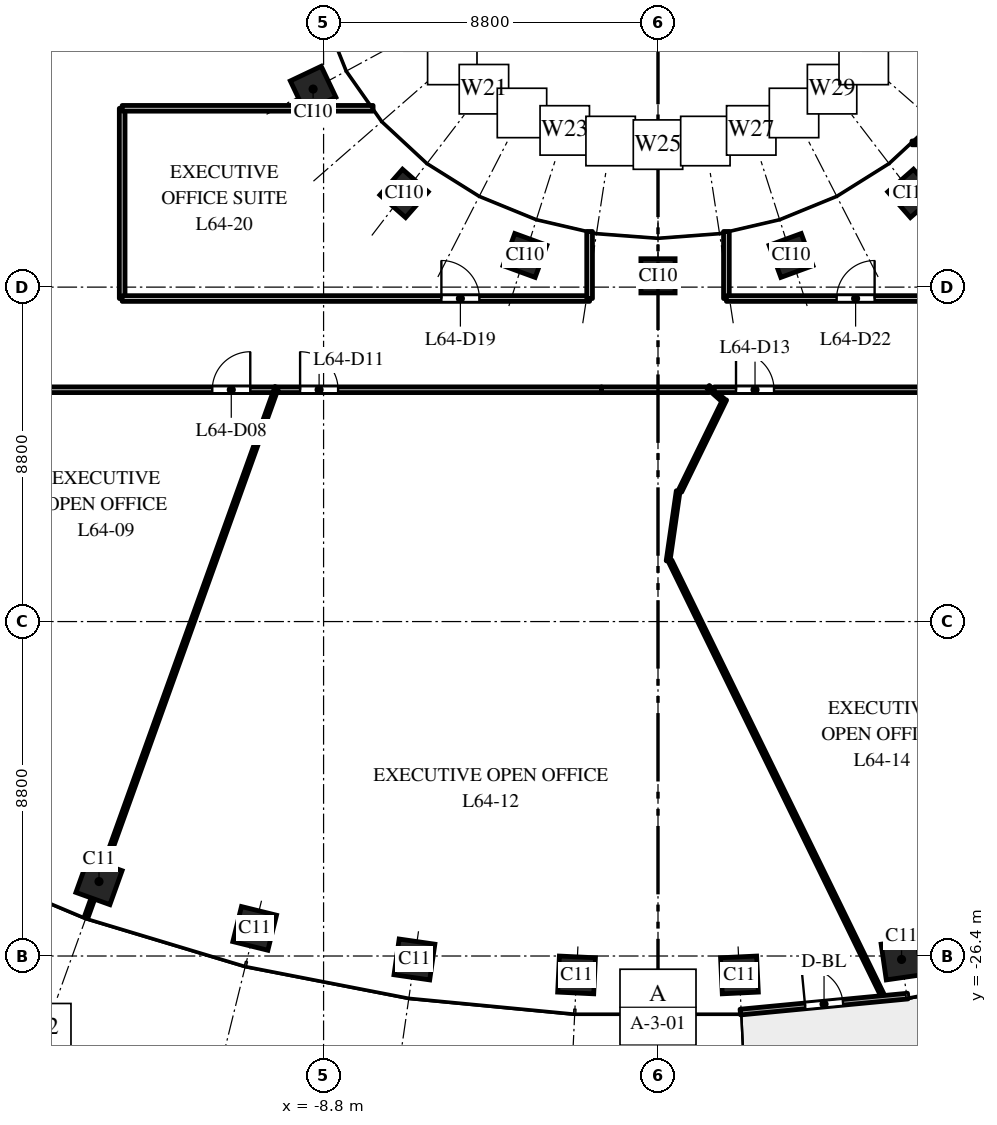
"""IFC4 building model, lengths in metres.
Left out: names, types, materials, properties, quantities, classifications, styles, units other than length and angle.
Written with IfcOpenShell. Run it as: python <this file> out.ifc"""

import sys

from ifc_helpers import new_model, si_unit, direction, frame, frame_2d, origin, origin_2d, place, context, subcontext, project, spatial, rectangle, extrude, element, fill, save


model = new_model("IFC4")
c1 = context("Model", 3, precision=1e-05, world=origin(), true_north=direction((0.0, 1.0)))
c2 = subcontext(c1, "Body", "Model", "MODEL_VIEW")
j1 = project(units=[si_unit("LENGTHUNIT", "METRE"), si_unit("PLANEANGLEUNIT", "RADIAN")], contexts=[c1])
p1 = place(None, origin())
s1 = spatial("IfcSite", under=j1, at=p1, CompositionType="ELEMENT")
p2 = place(p1, origin())
s2 = spatial("IfcBuilding", under=s1, at=p2, CompositionType="ELEMENT")
p3 = place(p2, frame((0.0, 0.0, 299.0)))
s3 = spatial("IfcBuildingStorey", under=s2, at=p3, CompositionType="ELEMENT", Elevation=299.0)
for number, where, z_axis, x_axis in (
    (1, (-14.709, -24.441, 0.0), (0.0, 0.0, 1.0), (0.941, -0.338, 0.0)),
    (2, (-10.613, -25.674, 0.0), (0.0, 0.0, 1.0), (0.971, -0.24, 0.0)),
    (3, (-6.409, -26.491, 0.0), (0.0, 0.0, 1.0), (0.99, -0.143, 0.0)),
    (4, (-2.143, -26.898, 0.0), (0.0, 0.0, 1.0), (0.999, -0.048, 0.0)),
    (5, (2.143, -26.898, 0.0), (0.0, 0.0, 1.0), (0.999, 0.048, 0.0)),
    (6, (6.409, -26.491, 0.0), (0.0, 0.0, 1.0), (0.99, 0.143, 0.0)),
):
    element("IfcColumn", number, at=place(p3, frame(where, z_axis=z_axis, x_axis=x_axis)), inside=s3, PredefinedType="COLUMN", context=c2, shape_type="SweptSolid", body=[
        extrude(rectangle(XDim=0.95, YDim=0.95, at=origin_2d()), origin(), (0.0, 0.0, 1.0), 4.0),
    ])
for number, where, z_axis, x_axis in (
    (7, (-9.076, -3.588, 0.0), (0.0, 0.0, 1.0), (0.429, -0.903, 0.0)),
    (8, (-6.682, -6.334, 0.0), (0.0, 0.0, 1.0), (0.751, -0.66, 0.0)),
    (9, (-3.501, -7.967, 0.0), (0.0, 0.0, 1.0), (0.939, -0.344, 0.0)),
    (10, (0.0, -8.503, 0.0), (0.0, 0.0, 1.0), (1.0, 0.0, 0.0)),
    (11, (3.501, -7.967, 0.0), (0.0, 0.0, 1.0), (0.939, 0.344, 0.0)),
    (12, (6.682, -6.334, 0.0), (0.0, 0.0, 1.0), (0.751, 0.66, 0.0)),
):
    element("IfcColumn", number, at=place(p3, frame(where, z_axis=z_axis, x_axis=x_axis)), inside=s3, PredefinedType="COLUMN", context=c2, shape_type="SweptSolid", body=[
        extrude(rectangle(XDim=0.9, YDim=0.9, at=origin_2d()), origin(), (0.0, 0.0, 1.0), 4.0),
    ])
p4 = place(p3, frame((2.166, -27.875, 0.0), z_axis=(0.0, 0.0, 1.0), x_axis=(0.995473879823, 0.095035543824, 0.0)))
e13 = element("IfcWall", 13, at=p4, inside=s3, PredefinedType="STANDARD", context=c2, shape_type="SweptSolid", body=[
    extrude(rectangle(XDim=4.426, YDim=0.15, at=frame_2d((2.213, 0.0))), origin(), (0.0, 0.0, 1.0), 3.7),
])
p5 = place(p4, frame((1.713, 0.0, 0.0)))
e14 = element("IfcOpeningElement", 14, at=p5, cuts=e13, PredefinedType="OPENING", context=c2, shape_type="SweptSolid", body=[
    extrude(rectangle(XDim=1.0, YDim=2.4, at=frame_2d((0.5, 1.2))), frame((0.0, 0.085, 0.0), z_axis=(0.0, -1.0, 0.0), x_axis=(1.0, 0.0, 0.0)), (0.0, 0.0, 1.0), 0.17),
])
p6 = place(p3, frame((-31.5, -11.5, 0.0), z_axis=(0.0, 0.0, 1.0), x_axis=(1.0, 0.0, 0.0)))
e15 = element("IfcWall", 15, at=p6, inside=s3, PredefinedType="PARTITIONING", context=c2, shape_type="SweptSolid", body=[
    extrude(rectangle(XDim=21.432, YDim=0.15, at=frame_2d((10.716, 0.0))), origin(), (0.0, 0.0, 1.0), 2.75),
])
p7 = place(p6, frame((9.15, 0.0, 0.0)))
e16 = element("IfcOpeningElement", 16, at=p7, cuts=e15, PredefinedType="OPENING", context=c2, shape_type="SweptSolid", body=[
    extrude(rectangle(XDim=1.0, YDim=2.1, at=frame_2d((0.5, 1.05))), frame((0.0, 0.085, 0.0), z_axis=(0.0, -1.0, 0.0), x_axis=(1.0, 0.0, 0.0)), (0.0, 0.0, 1.0), 0.17),
])
p8 = place(p6, frame((19.771, 0.0, 0.0)))
e17 = element("IfcOpeningElement", 17, at=p8, cuts=e15, PredefinedType="OPENING", context=c2, shape_type="SweptSolid", body=[
    extrude(rectangle(XDim=1.0, YDim=2.1, at=frame_2d((0.5, 1.05))), frame((0.0, 0.085, 0.0), z_axis=(0.0, -1.0, 0.0), x_axis=(1.0, 0.0, 0.0)), (0.0, 0.0, 1.0), 0.17),
])
p9 = place(p3, frame((-15.048, -25.383, 0.0), z_axis=(0.0, 0.0, 1.0), x_axis=(0.338396469125, 0.941003628943, 0.0)))
e18 = element("IfcWall", 18, at=p9, inside=s3, PredefinedType="PARTITIONING", context=c2, shape_type="SweptSolid", body=[
    extrude(rectangle(XDim=14.829, YDim=0.1, at=frame_2d((7.415, 0.0))), origin(), (0.0, 0.0, 1.0), 2.75),
])
p10 = place(p3, frame((-14.1, -9.1, 0.0), z_axis=(0.0, 0.0, 1.0), x_axis=(0.0, 1.0, 0.0)))
e19 = element("IfcWall", 19, at=p10, inside=s3, PredefinedType="PARTITIONING", context=c2, shape_type="SweptSolid", body=[
    extrude(rectangle(XDim=5.005, YDim=0.15, at=frame_2d((2.502, 0.0))), origin(), (0.0, 0.0, 1.0), 3.7),
])
p11 = place(p3, frame((-14.1, -9.1, 0.0), z_axis=(0.0, 0.0, 1.0), x_axis=(1.0, 0.0, 0.0)))
e20 = element("IfcWall", 20, at=p11, inside=s3, PredefinedType="PARTITIONING", context=c2, shape_type="SweptSolid", body=[
    extrude(rectangle(XDim=12.3, YDim=0.15, at=frame_2d((6.15, 0.0))), origin(), (0.0, 0.0, 1.0), 2.75),
])
p12 = place(p11, frame((8.4, 0.0, 0.0)))
e21 = element("IfcOpeningElement", 21, at=p12, cuts=e20, PredefinedType="OPENING", context=c2, shape_type="SweptSolid", body=[
    extrude(rectangle(XDim=1.0, YDim=2.1, at=frame_2d((0.5, 1.05))), frame((0.0, 0.085, 0.0), z_axis=(0.0, -1.0, 0.0), x_axis=(1.0, 0.0, 0.0)), (0.0, 0.0, 1.0), 0.17),
])
p13 = place(p3, frame((-14.1, -4.095, 0.0), z_axis=(0.0, 0.0, 1.0), x_axis=(1.0, 0.0, 0.0)))
e22 = element("IfcWall", 22, at=p13, inside=s3, PredefinedType="PARTITIONING", context=c2, shape_type="SweptSolid", body=[
    extrude(rectangle(XDim=6.603, YDim=0.15, at=frame_2d((3.302, 0.0))), origin(), (0.0, 0.0, 1.0), 3.0),
])
p14 = place(p3, frame((-10.003, -11.5, 0.0), z_axis=(0.0, 0.0, 1.0), x_axis=(1.0, 0.0, 0.0)))
e23 = element("IfcWall", 23, at=p14, inside=s3, PredefinedType="PARTITIONING", context=c2, shape_type="SweptSolid", body=[
    extrude(rectangle(XDim=8.518, YDim=0.15, at=frame_2d((4.259, 0.0))), origin(), (0.0, 0.0, 1.0), 2.75),
])
p15 = place(p14, frame((0.585, 0.0, 0.0)))
e24 = element("IfcOpeningElement", 24, at=p15, cuts=e23, PredefinedType="OPENING", context=c2, shape_type="SweptSolid", body=[
    extrude(rectangle(XDim=1.0, YDim=2.1, at=frame_2d((0.5, 1.05))), frame((0.0, 0.085, 0.0), z_axis=(0.0, -1.0, 0.0), x_axis=(1.0, 0.0, 0.0)), (0.0, 0.0, 1.0), 0.17),
])
p16 = place(p3, frame((-1.8, -9.1, 0.0), z_axis=(0.0, 0.0, 1.0), x_axis=(0.0, 1.0, 0.0)))
e25 = element("IfcWall", 25, at=p16, inside=s3, PredefinedType="PARTITIONING", context=c2, shape_type="SweptSolid", body=[
    extrude(rectangle(XDim=1.764, YDim=0.15, at=frame_2d((0.882, 0.0))), origin(), (0.0, 0.0, 1.0), 3.0),
])
p17 = place(p3, frame((-1.488, -11.5, 0.0), z_axis=(0.0, 0.0, 1.0), x_axis=(1.0, 0.0, 0.0)))
e26 = element("IfcWall", 26, at=p17, inside=s3, PredefinedType="PARTITIONING", context=c2, shape_type="SweptSolid", body=[
    extrude(rectangle(XDim=2.841, YDim=0.15, at=frame_2d((1.42, 0.0))), origin(), (0.0, 0.0, 1.0), 2.85),
])
p18 = place(p3, frame((0.265, -16.008, 0.0), z_axis=(0.0, 0.0, 1.0), x_axis=(0.142907964002, 0.989735981878, 0.0)))
e27 = element("IfcWall", 27, at=p18, inside=s3, PredefinedType="PARTITIONING", context=c2, shape_type="SweptSolid", body=[
    extrude(rectangle(XDim=1.862, YDim=0.1, at=frame_2d((0.931, 0.0))), origin(), (0.0, 0.0, 1.0), 3.7),
])
p19 = place(p3, frame((0.317, -16.0, 0.0), z_axis=(0.0, 0.0, 1.0), x_axis=(0.43922717886, -0.898376026701, 0.0)))
e28 = element("IfcWall", 28, at=p19, inside=s3, PredefinedType="PARTITIONING", context=c2, shape_type="SweptSolid", body=[
    extrude(rectangle(XDim=12.843, YDim=0.1, at=frame_2d((6.422, 0.0))), origin(), (0.0, 0.0, 1.0), 3.0),
])
p20 = place(p3, frame((0.577, -14.173, 0.0), z_axis=(0.0, 0.0, 1.0), x_axis=(0.43904776377, 0.898463722767, 0.0)))
e29 = element("IfcWall", 29, at=p20, inside=s3, PredefinedType="PARTITIONING", context=c2, shape_type="SweptSolid", body=[
    extrude(rectangle(XDim=2.697, YDim=0.1, at=frame_2d((1.349, 0.0))), origin(), (0.0, 0.0, 1.0), 3.7),
])
p21 = place(p3, frame((1.318, -11.425, 0.0), z_axis=(0.0, 0.0, 1.0), x_axis=(0.748043921786, -0.663649222918, 0.0)))
e30 = element("IfcWall", 30, at=p21, inside=s3, PredefinedType="PARTITIONING", context=c2, shape_type="SweptSolid", body=[
    extrude(rectangle(XDim=0.509, YDim=0.1, at=frame_2d((0.254, 0.0))), origin(), (0.0, 0.0, 1.0), 3.7),
])
p22 = place(p3, frame((1.478, -11.5, 0.0), z_axis=(0.0, 0.0, 1.0), x_axis=(1.0, 0.0, 0.0)))
e31 = element("IfcWall", 31, at=p22, inside=s3, PredefinedType="PARTITIONING", context=c2, shape_type="SweptSolid", body=[
    extrude(rectangle(XDim=5.634, YDim=0.15, at=frame_2d((2.817, 0.0))), origin(), (0.0, 0.0, 1.0), 2.85),
])
p23 = place(p22, frame((0.575, 0.0, 0.0)))
e32 = element("IfcOpeningElement", 32, at=p23, cuts=e31, PredefinedType="OPENING", context=c2, shape_type="SweptSolid", body=[
    extrude(rectangle(XDim=1.0, YDim=2.1, at=frame_2d((0.5, 1.05))), frame((0.0, 0.085, 0.0), z_axis=(0.0, -1.0, 0.0), x_axis=(1.0, 0.0, 0.0)), (0.0, 0.0, 1.0), 0.17),
])
p24 = place(p3, frame((1.8, -9.1, 0.0), z_axis=(0.0, 0.0, 1.0), x_axis=(0.0, 1.0, 0.0)))
e33 = element("IfcWall", 33, at=p24, inside=s3, PredefinedType="PARTITIONING", context=c2, shape_type="SweptSolid", body=[
    extrude(rectangle(XDim=1.764, YDim=0.15, at=frame_2d((0.882, 0.0))), origin(), (0.0, 0.0, 1.0), 3.0),
])
p25 = place(p3, frame((1.8, -9.1, 0.0), z_axis=(0.0, 0.0, 1.0), x_axis=(1.0, 0.0, 0.0)))
e34 = element("IfcWall", 34, at=p25, inside=s3, PredefinedType="PARTITIONING", context=c2, shape_type="SweptSolid", body=[
    extrude(rectangle(XDim=12.3, YDim=0.15, at=frame_2d((6.15, 0.0))), origin(), (0.0, 0.0, 1.0), 2.85),
])
p26 = place(p25, frame((2.9, 0.0, 0.0)))
e35 = element("IfcOpeningElement", 35, at=p26, cuts=e34, PredefinedType="OPENING", context=c2, shape_type="SweptSolid", body=[
    extrude(rectangle(XDim=1.0, YDim=2.1, at=frame_2d((0.5, 1.05))), frame((0.0, 0.085, 0.0), z_axis=(0.0, -1.0, 0.0), x_axis=(1.0, 0.0, 0.0)), (0.0, 0.0, 1.0), 0.17),
])
p27 = place(p3, frame((6.684, -5.005, 0.0), z_axis=(0.0, 0.0, 1.0), x_axis=(1.0, 0.0, 0.0)))
e36 = element("IfcWall", 36, at=p27, inside=s3, PredefinedType="PARTITIONING", context=c2, shape_type="SweptSolid", body=[
    extrude(rectangle(XDim=7.341, YDim=0.1, at=frame_2d((3.67, 0.0))), origin(), (0.0, 0.0, 1.0), 2.75),
])
p28 = place(p5, origin())
e37 = element("IfcDoor", 37, at=p28, inside=s3, OperationType="SINGLE_SWING_LEFT", PredefinedType="DOOR", context=c2, shape_type="SweptSolid", body=[
    extrude(rectangle(XDim=1.0, YDim=2.4, at=frame_2d((0.5, 1.2))), frame((0.0, 0.025, 0.0), z_axis=(0.0, -1.0, 0.0), x_axis=(1.0, 0.0, 0.0)), (0.0, 0.0, 1.0), 0.05),
])
fill(e14, e37)
p29 = place(p8, origin())
e38 = element("IfcDoor", 38, at=p29, inside=s3, OperationType="SINGLE_SWING_RIGHT", PredefinedType="DOOR", context=c2, shape_type="SweptSolid", body=[
    extrude(rectangle(XDim=1.0, YDim=2.1, at=frame_2d((0.5, 1.05))), frame((0.0, 0.025, 0.0), z_axis=(0.0, -1.0, 0.0), x_axis=(1.0, 0.0, 0.0)), (0.0, 0.0, 1.0), 0.05),
])
fill(e17, e38)
p30 = place(p15, origin())
e39 = element("IfcDoor", 39, at=p30, inside=s3, OperationType="SINGLE_SWING_LEFT", PredefinedType="DOOR", context=c2, shape_type="SweptSolid", body=[
    extrude(rectangle(XDim=1.0, YDim=2.1, at=frame_2d((0.5, 1.05))), frame((0.0, 0.025, 0.0), z_axis=(0.0, -1.0, 0.0), x_axis=(1.0, 0.0, 0.0)), (0.0, 0.0, 1.0), 0.05),
])
fill(e24, e39)
p31 = place(p23, origin())
e40 = element("IfcDoor", 40, at=p31, inside=s3, OperationType="SINGLE_SWING_LEFT", PredefinedType="DOOR", context=c2, shape_type="SweptSolid", body=[
    extrude(rectangle(XDim=1.0, YDim=2.1, at=frame_2d((0.5, 1.05))), frame((0.0, 0.025, 0.0), z_axis=(0.0, -1.0, 0.0), x_axis=(1.0, 0.0, 0.0)), (0.0, 0.0, 1.0), 0.05),
])
fill(e32, e40)
p32 = place(p12, origin())
e41 = element("IfcDoor", 41, at=p32, inside=s3, OperationType="SINGLE_SWING_LEFT", PredefinedType="DOOR", context=c2, shape_type="SweptSolid", body=[
    extrude(rectangle(XDim=1.0, YDim=2.1, at=frame_2d((0.5, 1.05))), frame((0.0, 0.025, 0.0), z_axis=(0.0, -1.0, 0.0), x_axis=(1.0, 0.0, 0.0)), (0.0, 0.0, 1.0), 0.05),
])
fill(e21, e41)
p33 = place(p26, origin())
e42 = element("IfcDoor", 42, at=p33, inside=s3, OperationType="SINGLE_SWING_RIGHT", PredefinedType="DOOR", context=c2, shape_type="SweptSolid", body=[
    extrude(rectangle(XDim=1.0, YDim=2.1, at=frame_2d((0.5, 1.05))), frame((0.0, 0.025, 0.0), z_axis=(0.0, -1.0, 0.0), x_axis=(1.0, 0.0, 0.0)), (0.0, 0.0, 1.0), 0.05),
])
fill(e35, e42)
save(model, sys.argv[1])
